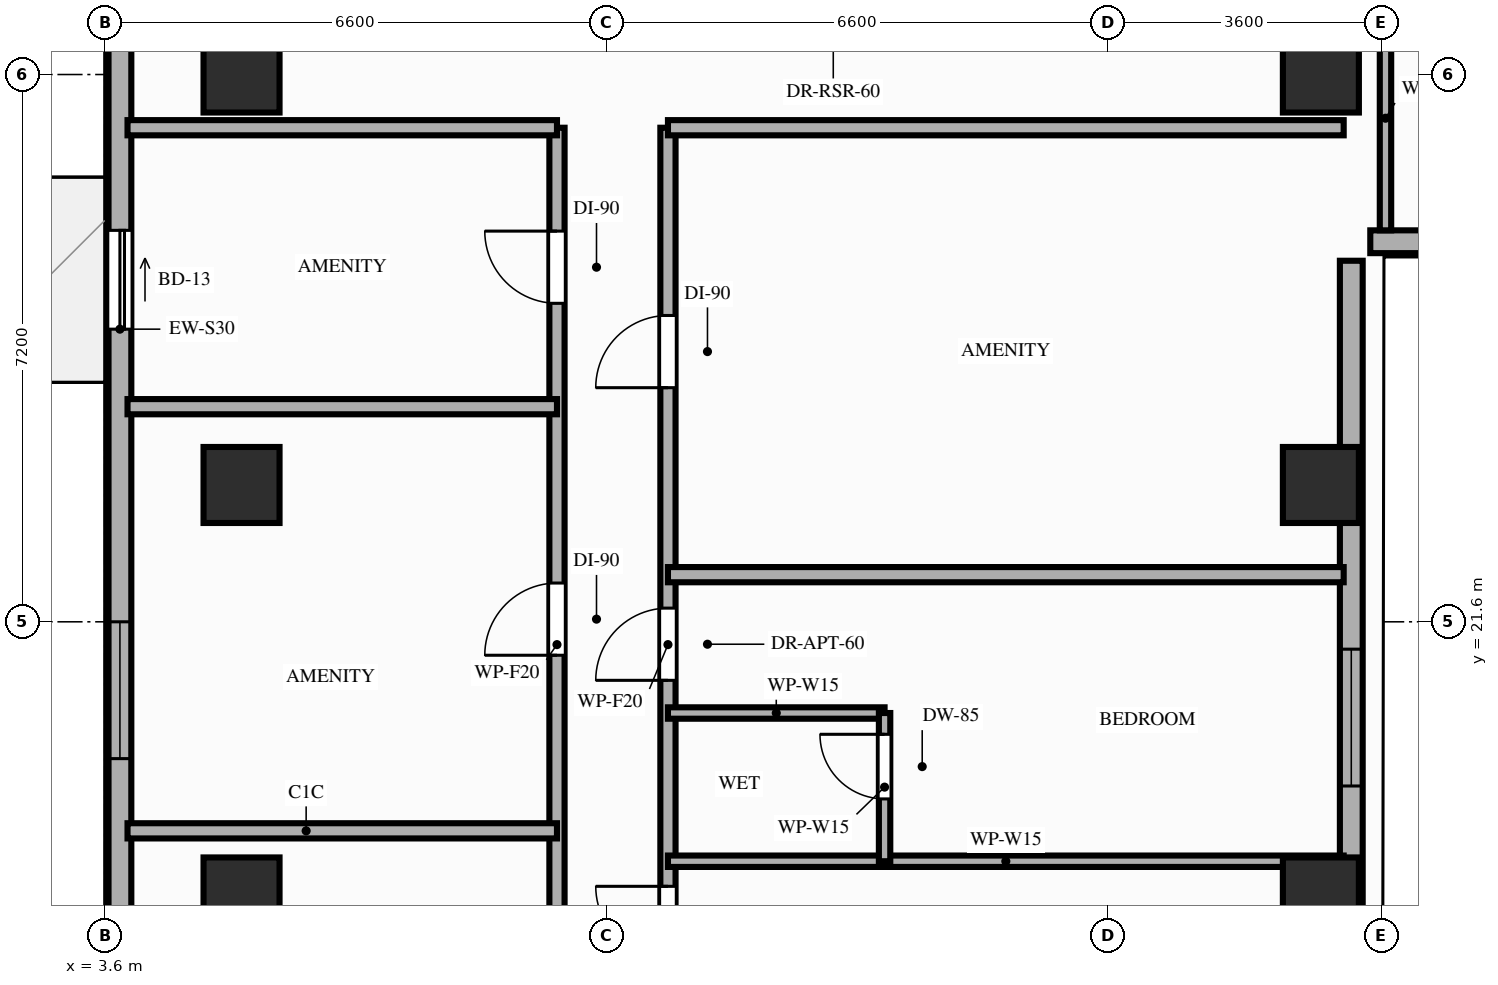
"""IFC4 building model, lengths in metres.
Left out: names, types, materials, properties, quantities, classifications, styles, units other than length and angle.
Written with IfcOpenShell. Run it as: python <this file> out.ifc"""

import sys

from ifc_helpers import new_model, si_unit, direction, frame, frame_2d, origin, origin_2d, place, context, subcontext, project, spatial, rectangle, extrude, element, fill, save


model = new_model("IFC4")
c1 = context("Model", 3, precision=1e-05, world=origin(), true_north=direction((0.0, 1.0)))
c2 = subcontext(c1, "Body", "Model", "MODEL_VIEW")
j1 = project(units=[si_unit("LENGTHUNIT", "METRE"), si_unit("PLANEANGLEUNIT", "RADIAN")], contexts=[c1])
p1 = place(None, origin())
s1 = spatial("IfcSite", under=j1, at=p1, CompositionType="ELEMENT")
p2 = place(p1, origin())
s2 = spatial("IfcBuilding", under=s1, at=p2, CompositionType="ELEMENT")
p3 = place(p2, frame((0.0, 0.0, 142.6)))
s3 = spatial("IfcBuildingStorey", under=s2, at=p3, CompositionType="ELEMENT", Elevation=142.6)
for number, where, z_axis, x_axis in (
    (1, (5.4, 18.0, 0.0), (0.0, 0.0, 1.0), (1.0, 0.0, 0.0)),
    (2, (19.6, 18.0, 0.0), (0.0, 0.0, 1.0), (1.0, 0.0, 0.0)),
    (3, (5.4, 23.4, 0.0), (0.0, 0.0, 1.0), (1.0, 0.0, 0.0)),
    (4, (19.6, 23.4, 0.0), (0.0, 0.0, 1.0), (1.0, 0.0, 0.0)),
    (5, (5.4, 28.8, 0.0), (0.0, 0.0, 1.0), (1.0, 0.0, 0.0)),
    (6, (19.6, 28.8, 0.0), (0.0, 0.0, 1.0), (1.0, 0.0, 0.0)),
):
    element("IfcColumn", number, at=place(p3, frame(where, z_axis=z_axis, x_axis=x_axis)), inside=s3, PredefinedType="COLUMN", context=c2, shape_type="SweptSolid", body=[
        extrude(rectangle(XDim=1.0, YDim=1.0, at=origin_2d()), origin(), (0.0, 0.0, 1.0), 3.2),
    ])
p4 = place(p3, frame((3.8, 42.1, 0.0), z_axis=(0.0, 0.0, 1.0), x_axis=(0.0, -1.0, 0.0)))
e7 = element("IfcWall", 7, at=p4, inside=s3, PredefinedType="STANDARD", context=c2, shape_type="SweptSolid", body=[
    extrude(rectangle(XDim=33.3, YDim=0.3, at=frame_2d((16.65, 0.0))), origin(), (0.0, 0.0, 1.0), 2.71),
])
p5 = place(p4, frame((25.52, 0.0, 0.0)))
e8 = element("IfcOpeningElement", 8, at=p5, cuts=e7, PredefinedType="OPENING", context=c2, shape_type="SweptSolid", body=[
    extrude(rectangle(XDim=1.3, YDim=2.08, at=frame_2d((0.65, 1.04))), frame((0.0, 0.16, 0.0), z_axis=(0.0, -1.0, 0.0), x_axis=(1.0, 0.0, 0.0)), (0.0, 0.0, 1.0), 0.32),
])
p6 = place(p4, frame((15.35, 0.0, 0.0)))
e9 = element("IfcOpeningElement", 9, at=p6, cuts=e7, PredefinedType="OPENING", context=c2, shape_type="SweptSolid", body=[
    extrude(rectangle(XDim=1.3, YDim=2.08, at=frame_2d((0.65, 1.04))), frame((0.0, 0.16, 0.0), z_axis=(0.0, -1.0, 0.0), x_axis=(1.0, 0.0, 0.0)), (0.0, 0.0, 1.0), 0.32),
])
p7 = place(p4, frame((29.48, 0.0, 0.85)))
e10 = element("IfcOpeningElement", 10, at=p7, cuts=e7, PredefinedType="OPENING", context=c2, shape_type="SweptSolid", body=[
    extrude(rectangle(XDim=1.8, YDim=1.61, at=frame_2d((0.9, 0.805))), frame((0.0, 0.16, 0.0), z_axis=(0.0, -1.0, 0.0), x_axis=(1.0, 0.0, 0.0)), (0.0, 0.0, 1.0), 0.32),
])
p8 = place(p4, frame((20.5, 0.0, 0.85)))
e11 = element("IfcOpeningElement", 11, at=p8, cuts=e7, PredefinedType="OPENING", context=c2, shape_type="SweptSolid", body=[
    extrude(rectangle(XDim=1.8, YDim=1.61, at=frame_2d((0.9, 0.805))), frame((0.0, 0.16, 0.0), z_axis=(0.0, -1.0, 0.0), x_axis=(1.0, 0.0, 0.0)), (0.0, 0.0, 1.0), 0.32),
])
p9 = place(p4, frame((9.9, 0.0, 0.85)))
e12 = element("IfcOpeningElement", 12, at=p9, cuts=e7, PredefinedType="OPENING", context=c2, shape_type="SweptSolid", body=[
    extrude(rectangle(XDim=1.8, YDim=1.61, at=frame_2d((0.9, 0.805))), frame((0.0, 0.16, 0.0), z_axis=(0.0, -1.0, 0.0), x_axis=(1.0, 0.0, 0.0)), (0.0, 0.0, 1.0), 0.32),
])
p10 = place(p4, frame((3.8, 0.0, 0.85)))
e13 = element("IfcOpeningElement", 13, at=p10, cuts=e7, PredefinedType="OPENING", context=c2, shape_type="SweptSolid", body=[
    extrude(rectangle(XDim=1.8, YDim=1.61, at=frame_2d((0.9, 0.805))), frame((0.0, 0.16, 0.0), z_axis=(0.0, -1.0, 0.0), x_axis=(1.0, 0.0, 0.0)), (0.0, 0.0, 1.0), 0.32),
])
p11 = place(p3, frame((20.0, 8.8, 0.0), z_axis=(0.0, 0.0, 1.0), x_axis=(0.0, 1.0, 0.0)))
e14 = element("IfcWall", 14, at=p11, inside=s3, PredefinedType="STANDARD", context=c2, shape_type="SweptSolid", body=[
    extrude(rectangle(XDim=17.55, YDim=0.3, at=frame_2d((8.775, 0.0))), origin(), (0.0, 0.0, 1.0), 2.45),
])
p12 = place(p11, frame((10.64, 0.0, 0.85)))
e15 = element("IfcOpeningElement", 15, at=p12, cuts=e14, PredefinedType="OPENING", context=c2, shape_type="SweptSolid", body=[
    extrude(rectangle(XDim=1.8, YDim=1.35, at=frame_2d((0.9, 0.675))), frame((0.0, 0.16, 0.0), z_axis=(0.0, -1.0, 0.0), x_axis=(1.0, 0.0, 0.0)), (0.0, 0.0, 1.0), 0.32),
])
p13 = place(p11, frame((5.95, 0.0, 0.85)))
e16 = element("IfcOpeningElement", 16, at=p13, cuts=e14, PredefinedType="OPENING", context=c2, shape_type="SweptSolid", body=[
    extrude(rectangle(XDim=1.8, YDim=1.35, at=frame_2d((0.9, 0.675))), frame((0.0, 0.16, 0.0), z_axis=(0.0, -1.0, 0.0), x_axis=(1.0, 0.0, 0.0)), (0.0, 0.0, 1.0), 0.32),
])
p14 = place(p3, frame((20.25, 26.6, 0.0), z_axis=(0.0, 0.0, 1.0), x_axis=(1.0, 0.0, 0.0)))
e17 = element("IfcWall", 17, at=p14, inside=s3, PredefinedType="STANDARD", context=c2, shape_type="SweptSolid", body=[
    extrude(rectangle(XDim=26.15, YDim=0.3, at=frame_2d((13.075, 0.0))), origin(), (0.0, 0.0, 1.0), 2.71),
])
p15 = place(p14, frame((13.9, 0.0, 0.0)))
e18 = element("IfcOpeningElement", 18, at=p15, cuts=e17, PredefinedType="OPENING", context=c2, shape_type="SweptSolid", body=[
    extrude(rectangle(XDim=1.3, YDim=2.08, at=frame_2d((0.65, 1.04))), frame((0.0, 0.16, 0.0), z_axis=(0.0, -1.0, 0.0), x_axis=(1.0, 0.0, 0.0)), (0.0, 0.0, 1.0), 0.32),
])
p16 = place(p14, frame((2.25, 0.0, 0.85)))
e19 = element("IfcOpeningElement", 19, at=p16, cuts=e17, PredefinedType="OPENING", context=c2, shape_type="SweptSolid", body=[
    extrude(rectangle(XDim=1.8, YDim=1.61, at=frame_2d((0.9, 0.805))), frame((0.0, 0.16, 0.0), z_axis=(0.0, -1.0, 0.0), x_axis=(1.0, 0.0, 0.0)), (0.0, 0.0, 1.0), 0.32),
])
p17 = place(p14, frame((7.75, 0.0, 0.85)))
e20 = element("IfcOpeningElement", 20, at=p17, cuts=e17, PredefinedType="OPENING", context=c2, shape_type="SweptSolid", body=[
    extrude(rectangle(XDim=1.8, YDim=1.61, at=frame_2d((0.9, 0.805))), frame((0.0, 0.16, 0.0), z_axis=(0.0, -1.0, 0.0), x_axis=(1.0, 0.0, 0.0)), (0.0, 0.0, 1.0), 0.32),
])
p18 = place(p14, frame((22.25, 0.0, 0.85)))
e21 = element("IfcOpeningElement", 21, at=p18, cuts=e17, PredefinedType="OPENING", context=c2, shape_type="SweptSolid", body=[
    extrude(rectangle(XDim=1.8, YDim=1.61, at=frame_2d((0.9, 0.805))), frame((0.0, 0.16, 0.0), z_axis=(0.0, -1.0, 0.0), x_axis=(1.0, 0.0, 0.0)), (0.0, 0.0, 1.0), 0.32),
])
p19 = place(p3, frame((9.55, 14.5, 0.0), z_axis=(0.0, 0.0, 1.0), x_axis=(0.0, 1.0, 0.0)))
e22 = element("IfcWall", 22, at=p19, inside=s3, PredefinedType="PARTITIONING", context=c2, shape_type="SweptSolid", body=[
    extrude(rectangle(XDim=13.6, YDim=0.2, at=frame_2d((6.8, 0.0))), origin(), (0.0, 0.0, 1.0), 2.45),
])
p20 = place(p19, frame((1.7, 0.0, 0.0)))
e23 = element("IfcOpeningElement", 23, at=p20, cuts=e22, PredefinedType="OPENING", context=c2, shape_type="SweptSolid", body=[
    extrude(rectangle(XDim=0.95, YDim=2.15, at=frame_2d((0.475, 1.075))), frame((0.0, 0.11, 0.0), z_axis=(0.0, -1.0, 0.0), x_axis=(1.0, 0.0, 0.0)), (0.0, 0.0, 1.0), 0.22),
])
p21 = place(p19, frame((6.66, 0.0, 0.0)))
e24 = element("IfcOpeningElement", 24, at=p21, cuts=e22, PredefinedType="OPENING", context=c2, shape_type="SweptSolid", body=[
    extrude(rectangle(XDim=0.95, YDim=2.15, at=frame_2d((0.475, 1.075))), frame((0.0, 0.11, 0.0), z_axis=(0.0, -1.0, 0.0), x_axis=(1.0, 0.0, 0.0)), (0.0, 0.0, 1.0), 0.22),
])
p22 = place(p19, frame((11.29, 0.0, 0.0)))
e25 = element("IfcOpeningElement", 25, at=p22, cuts=e22, PredefinedType="OPENING", context=c2, shape_type="SweptSolid", body=[
    extrude(rectangle(XDim=0.95, YDim=2.15, at=frame_2d((0.475, 1.075))), frame((0.0, 0.11, 0.0), z_axis=(0.0, -1.0, 0.0), x_axis=(1.0, 0.0, 0.0)), (0.0, 0.0, 1.0), 0.22),
])
p23 = place(p3, frame((11.01, 14.5, 0.0), z_axis=(0.0, 0.0, 1.0), x_axis=(0.0, 1.0, 0.0)))
e26 = element("IfcWall", 26, at=p23, inside=s3, PredefinedType="PARTITIONING", context=c2, shape_type="SweptSolid", body=[
    extrude(rectangle(XDim=13.6, YDim=0.2, at=frame_2d((6.8, 0.0))), origin(), (0.0, 0.0, 1.0), 2.45),
])
p24 = place(p23, frame((0.45, 0.0, 0.0)))
e27 = element("IfcOpeningElement", 27, at=p24, cuts=e26, PredefinedType="OPENING", context=c2, shape_type="SweptSolid", body=[
    extrude(rectangle(XDim=0.95, YDim=2.15, at=frame_2d((0.475, 1.075))), frame((0.0, 0.11, 0.0), z_axis=(0.0, -1.0, 0.0), x_axis=(1.0, 0.0, 0.0)), (0.0, 0.0, 1.0), 0.22),
])
p25 = place(p23, frame((2.67, 0.0, 0.0)))
e28 = element("IfcOpeningElement", 28, at=p25, cuts=e26, PredefinedType="OPENING", context=c2, shape_type="SweptSolid", body=[
    extrude(rectangle(XDim=0.95, YDim=2.1, at=frame_2d((0.475, 1.05))), frame((0.0, 0.11, 0.0), z_axis=(0.0, -1.0, 0.0), x_axis=(1.0, 0.0, 0.0)), (0.0, 0.0, 1.0), 0.22),
])
p26 = place(p23, frame((10.18, 0.0, 0.0)))
e29 = element("IfcOpeningElement", 29, at=p26, cuts=e26, PredefinedType="OPENING", context=c2, shape_type="SweptSolid", body=[
    extrude(rectangle(XDim=0.95, YDim=2.15, at=frame_2d((0.475, 1.075))), frame((0.0, 0.11, 0.0), z_axis=(0.0, -1.0, 0.0), x_axis=(1.0, 0.0, 0.0)), (0.0, 0.0, 1.0), 0.22),
])
p27 = place(p23, frame((6.33, 0.0, 0.0)))
e30 = element("IfcOpeningElement", 30, at=p27, cuts=e26, PredefinedType="OPENING", context=c2, shape_type="SweptSolid", body=[
    extrude(rectangle(XDim=0.95, YDim=2.15, at=frame_2d((0.475, 1.075))), frame((0.0, 0.11, 0.0), z_axis=(0.0, -1.0, 0.0), x_axis=(1.0, 0.0, 0.0)), (0.0, 0.0, 1.0), 0.22),
])
p28 = place(p3, frame((3.9, 28.1, 0.0), z_axis=(0.0, 0.0, 1.0), x_axis=(1.0, 0.0, 0.0)))
e31 = element("IfcWall", 31, at=p28, inside=s3, PredefinedType="PARTITIONING", context=c2, shape_type="SweptSolid", body=[
    extrude(rectangle(XDim=5.65, YDim=0.2, at=frame_2d((2.825, 0.0))), origin(), (0.0, 0.0, 1.0), 2.45),
])
p29 = place(p3, frame((11.01, 28.1, 0.0), z_axis=(0.0, 0.0, 1.0), x_axis=(1.0, 0.0, 0.0)))
e32 = element("IfcWall", 32, at=p29, inside=s3, PredefinedType="PARTITIONING", context=c2, shape_type="SweptSolid", body=[
    extrude(rectangle(XDim=8.89, YDim=0.2, at=frame_2d((4.445, 0.0))), origin(), (0.0, 0.0, 1.0), 2.45),
])
p30 = place(p3, frame((20.45, 26.75, 0.0), z_axis=(0.0, 0.0, 1.0), x_axis=(0.0, 1.0, 0.0)))
e33 = element("IfcWall", 33, at=p30, inside=s3, PredefinedType="PARTITIONING", context=c2, shape_type="SweptSolid", body=[
    extrude(rectangle(XDim=2.95, YDim=0.15, at=frame_2d((1.475, 0.0))), origin(), (0.0, 0.0, 1.0), 2.45),
])
for number, where, z_axis, x_axis in (
    (34, (3.9, 18.85, 0.0), (0.0, 0.0, 1.0), (1.0, 0.0, 0.0)),
    (35, (3.9, 24.43, 0.0), (0.0, 0.0, 1.0), (1.0, 0.0, 0.0)),
):
    element("IfcWall", number, at=place(p3, frame(where, z_axis=z_axis, x_axis=x_axis)), inside=s3, PredefinedType="PARTITIONING", context=c2, shape_type="SweptSolid", body=[
        extrude(rectangle(XDim=5.65, YDim=0.2, at=frame_2d((2.825, 0.0))), origin(), (0.0, 0.0, 1.0), 2.45),
    ])
p31 = place(p3, frame((11.01, 18.45, 0.0), z_axis=(0.0, 0.0, 1.0), x_axis=(1.0, 0.0, 0.0)))
e36 = element("IfcWall", 36, at=p31, inside=s3, PredefinedType="PARTITIONING", context=c2, shape_type="SweptSolid", body=[
    extrude(rectangle(XDim=8.89, YDim=0.15, at=frame_2d((4.445, 0.0))), origin(), (0.0, 0.0, 1.0), 2.45),
])
p32 = place(p3, frame((11.01, 22.22, 0.0), z_axis=(0.0, 0.0, 1.0), x_axis=(1.0, 0.0, 0.0)))
e37 = element("IfcWall", 37, at=p32, inside=s3, PredefinedType="PARTITIONING", context=c2, shape_type="SweptSolid", body=[
    extrude(rectangle(XDim=8.89, YDim=0.2, at=frame_2d((4.445, 0.0))), origin(), (0.0, 0.0, 1.0), 2.45),
])
p33 = place(p3, frame((11.01, 20.4, 0.0), z_axis=(0.0, 0.0, 1.0), x_axis=(1.0, 0.0, 0.0)))
e38 = element("IfcWall", 38, at=p33, inside=s3, PredefinedType="PARTITIONING", context=c2, shape_type="SweptSolid", body=[
    extrude(rectangle(XDim=2.85, YDim=0.15, at=frame_2d((1.425, 0.0))), origin(), (0.0, 0.0, 1.0), 3.02),
])
p34 = place(p3, frame((13.86, 18.45, 0.0), z_axis=(0.0, 0.0, 1.0), x_axis=(0.0, 1.0, 0.0)))
e39 = element("IfcWall", 39, at=p34, inside=s3, PredefinedType="PARTITIONING", context=c2, shape_type="SweptSolid", body=[
    extrude(rectangle(XDim=1.95, YDim=0.15, at=frame_2d((0.975, 0.0))), origin(), (0.0, 0.0, 1.0), 2.61),
])
p35 = place(p34, frame((0.82, 0.0, 0.0)))
e40 = element("IfcOpeningElement", 40, at=p35, cuts=e39, PredefinedType="OPENING", context=c2, shape_type="SweptSolid", body=[
    extrude(rectangle(XDim=0.85, YDim=2.1, at=frame_2d((0.425, 1.05))), frame((0.0, 0.085, 0.0), z_axis=(0.0, -1.0, 0.0), x_axis=(1.0, 0.0, 0.0)), (0.0, 0.0, 1.0), 0.17),
])
p36 = place(p6, origin())
e41 = element("IfcDoor", 41, at=p36, inside=s3, OperationType="SLIDING_TO_LEFT", PredefinedType="DOOR", context=c2, shape_type="SweptSolid", body=[
    extrude(rectangle(XDim=1.3, YDim=2.08, at=frame_2d((0.65, 1.04))), frame((0.0, 0.025, 0.0), z_axis=(0.0, -1.0, 0.0), x_axis=(1.0, 0.0, 0.0)), (0.0, 0.0, 1.0), 0.05),
])
fill(e9, e41)
p37 = place(p12, origin())
e42 = element("IfcWindow", 42, at=p37, inside=s3, PartitioningType="SINGLE_PANEL", PredefinedType="WINDOW", context=c2, shape_type="SweptSolid", body=[
    extrude(rectangle(XDim=1.8, YDim=1.35, at=frame_2d((0.9, 0.675))), frame((0.0, 0.03, 0.0), z_axis=(0.0, -1.0, 0.0), x_axis=(1.0, 0.0, 0.0)), (0.0, 0.0, 1.0), 0.06),
])
fill(e15, e42)
p38 = place(p8, origin())
e43 = element("IfcWindow", 43, at=p38, inside=s3, PartitioningType="SINGLE_PANEL", PredefinedType="WINDOW", context=c2, shape_type="SweptSolid", body=[
    extrude(rectangle(XDim=1.8, YDim=1.61, at=frame_2d((0.9, 0.805))), frame((0.0, 0.03, 0.0), z_axis=(0.0, -1.0, 0.0), x_axis=(1.0, 0.0, 0.0)), (0.0, 0.0, 1.0), 0.06),
])
fill(e11, e43)
p39 = place(p21, origin())
e44 = element("IfcDoor", 44, at=p39, inside=s3, OperationType="SINGLE_SWING_LEFT", PredefinedType="DOOR", context=c2, shape_type="SweptSolid", body=[
    extrude(rectangle(XDim=0.95, YDim=2.15, at=frame_2d((0.475, 1.075))), frame((0.0, 0.025, 0.0), z_axis=(0.0, -1.0, 0.0), x_axis=(1.0, 0.0, 0.0)), (0.0, 0.0, 1.0), 0.05),
])
fill(e24, e44)
p40 = place(p22, origin())
e45 = element("IfcDoor", 45, at=p40, inside=s3, OperationType="SINGLE_SWING_RIGHT", PredefinedType="DOOR", context=c2, shape_type="SweptSolid", body=[
    extrude(rectangle(XDim=0.95, YDim=2.15, at=frame_2d((0.475, 1.075))), frame((0.0, 0.025, 0.0), z_axis=(0.0, -1.0, 0.0), x_axis=(1.0, 0.0, 0.0)), (0.0, 0.0, 1.0), 0.05),
])
fill(e25, e45)
p41 = place(p25, origin())
e46 = element("IfcDoor", 46, at=p41, inside=s3, OperationType="SINGLE_SWING_RIGHT", PredefinedType="DOOR", context=c2, shape_type="SweptSolid", body=[
    extrude(rectangle(XDim=0.95, YDim=2.1, at=frame_2d((0.475, 1.05))), frame((0.0, 0.025, 0.0), z_axis=(0.0, -1.0, 0.0), x_axis=(1.0, 0.0, 0.0)), (0.0, 0.0, 1.0), 0.05),
])
fill(e28, e46)
p42 = place(p26, origin())
e47 = element("IfcDoor", 47, at=p42, inside=s3, OperationType="SINGLE_SWING_LEFT", PredefinedType="DOOR", context=c2, shape_type="SweptSolid", body=[
    extrude(rectangle(XDim=0.95, YDim=2.15, at=frame_2d((0.475, 1.075))), frame((0.0, 0.025, 0.0), z_axis=(0.0, -1.0, 0.0), x_axis=(1.0, 0.0, 0.0)), (0.0, 0.0, 1.0), 0.05),
])
fill(e29, e47)
p43 = place(p35, origin())
e48 = element("IfcDoor", 48, at=p43, inside=s3, OperationType="SINGLE_SWING_RIGHT", PredefinedType="DOOR", context=c2, shape_type="SweptSolid", body=[
    extrude(rectangle(XDim=0.85, YDim=2.1, at=frame_2d((0.425, 1.05))), frame((0.0, 0.025, 0.0), z_axis=(0.0, -1.0, 0.0), x_axis=(1.0, 0.0, 0.0)), (0.0, 0.0, 1.0), 0.05),
])
fill(e40, e48)
p44 = place(p27, origin())
e49 = element("IfcDoor", 49, at=p44, inside=s3, OperationType="SINGLE_SWING_LEFT", PredefinedType="DOOR", context=c2, shape_type="SweptSolid", body=[
    extrude(rectangle(XDim=0.95, YDim=2.15, at=frame_2d((0.475, 1.075))), frame((0.0, 0.025, 0.0), z_axis=(0.0, -1.0, 0.0), x_axis=(1.0, 0.0, 0.0)), (0.0, 0.0, 1.0), 0.05),
])
fill(e30, e49)
save(model, sys.argv[1])
